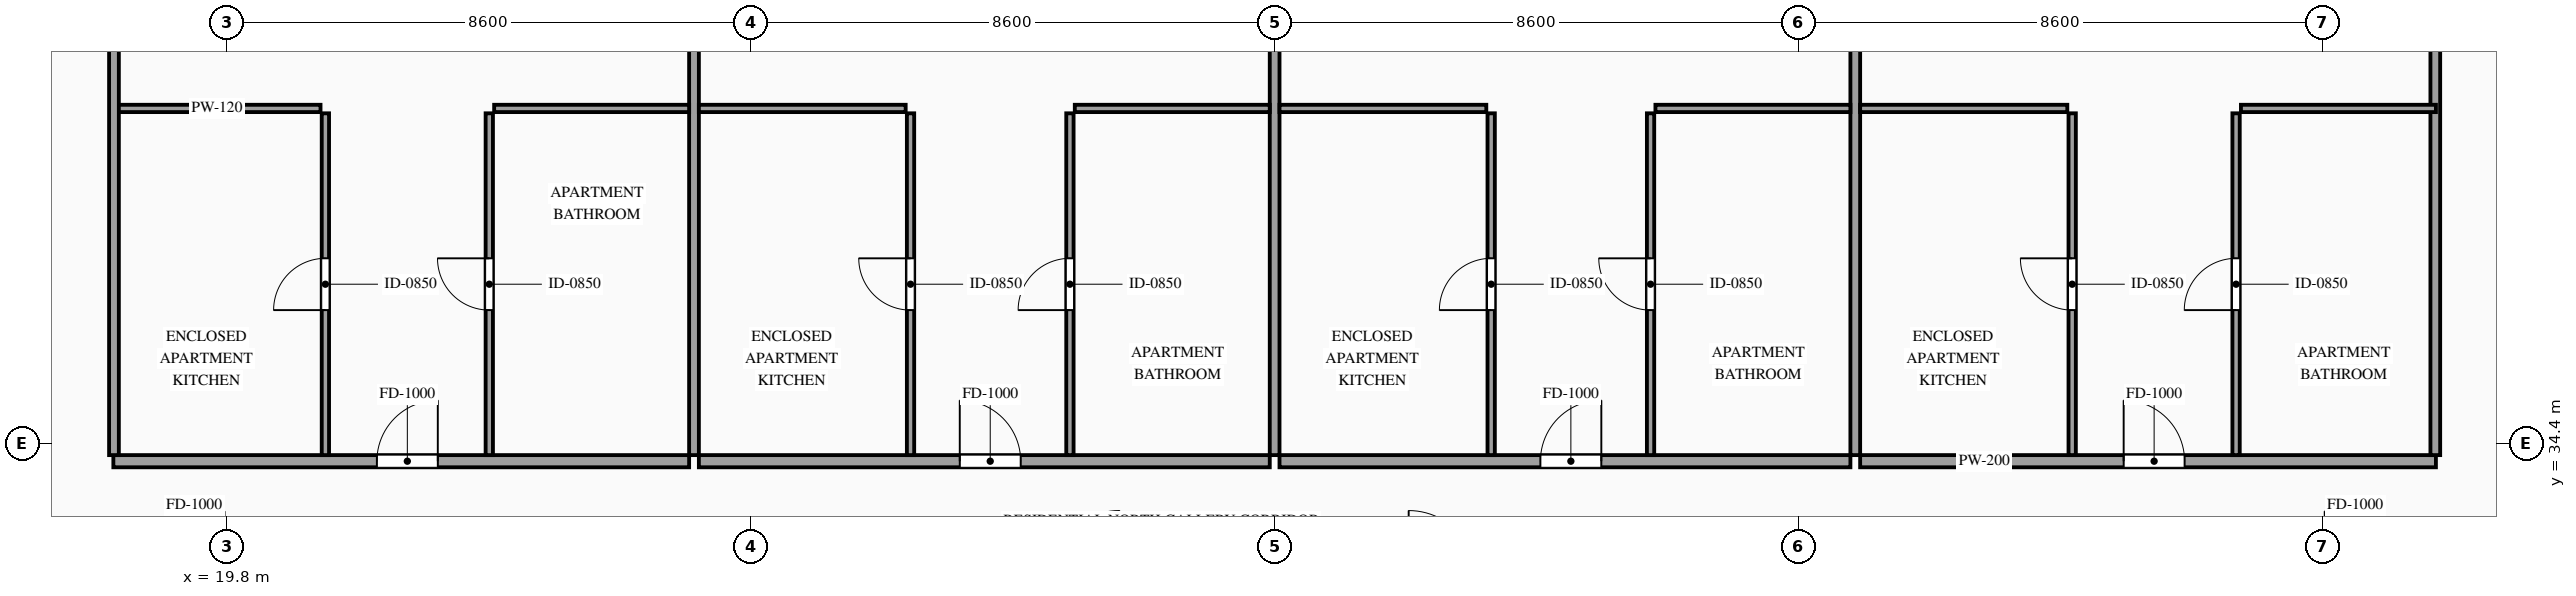
"""IFC4 building model, lengths in metres.
Left out: names, types, materials, properties, quantities, classifications, styles, units other than length and angle.
Written with IfcOpenShell. Run it as: python <this file> out.ifc"""

import sys

from ifc_helpers import new_model, si_unit, direction, frame, frame_2d, origin, place, context, subcontext, project, spatial, rectangle, extrude, source, transform, mapped, element, fill, save


model = new_model("IFC4")
c1 = context("Model", 3, precision=1e-05, world=origin(), true_north=direction((0.0, 1.0)))
c2 = subcontext(c1, "Body", "Model", "MODEL_VIEW")
j1 = project(units=[si_unit("LENGTHUNIT", "METRE"), si_unit("PLANEANGLEUNIT", "RADIAN")], contexts=[c1])
p1 = place(None, origin())
s1 = spatial("IfcSite", under=j1, at=p1, CompositionType="ELEMENT")
p2 = place(p1, origin())
s2 = spatial("IfcBuilding", under=s1, at=p2, CompositionType="ELEMENT")
p3 = place(p2, frame((0.0, 0.0, 181.0)))
s3 = spatial("IfcBuildingStorey", under=s2, at=p3, CompositionType="ELEMENT", Elevation=181.0)
p4 = place(p3, frame((17.94, 34.11, 0.0), z_axis=(0.0, 0.0, 1.0), x_axis=(1.0, 0.0, 0.0)))
e1 = element("IfcWall", 1, at=p4, inside=s3, PredefinedType="PARTITIONING", context=c2, shape_type="SweptSolid", body=[
    extrude(rectangle(XDim=9.45, YDim=0.2, at=frame_2d((4.725, 0.0))), origin(), (0.0, 0.0, 1.0), 3.28),
])
p5 = place(p4, frame((4.325, 0.0, 0.0)))
e2 = element("IfcOpeningElement", 2, at=p5, cuts=e1, PredefinedType="OPENING", context=c2, shape_type="SweptSolid", body=[
    extrude(rectangle(XDim=1.0, YDim=2.2, at=frame_2d((0.5, 1.1))), frame((0.0, 0.115, 0.0), z_axis=(0.0, -1.0, 0.0), x_axis=(1.0, 0.0, 0.0)), (0.0, 0.0, 1.0), 0.23),
])
m1 = source(origin(), c2, "Body", "SweptSolid", [
    extrude(rectangle(XDim=13.54, YDim=0.16, at=frame_2d((6.77, 0.0))), origin(), (0.0, 0.0, 1.0), 3.28),
])
p6 = place(p3, frame((27.47, 34.21, 0.0), z_axis=(0.0, 0.0, 1.0), x_axis=(0.0, 1.0, 0.0)))
e3 = element("IfcWall", 3, at=p6, inside=s3, PredefinedType="PARTITIONING", context=c2, shape_type="MappedRepresentation", body=[
    mapped(m1, transform((0.0, 0.0, 0.0), scale=1.0)),
])
m2 = source(origin(), c2, "Body", "SweptSolid", [
    extrude(rectangle(XDim=3.4, YDim=0.12, at=frame_2d((1.7, 0.0))), origin(), (0.0, 0.0, 1.0), 3.28),
])
p7 = place(p3, frame((17.94, 39.9, 0.0), z_axis=(0.0, 0.0, 1.0), x_axis=(1.0, 0.0, 0.0)))
e4 = element("IfcWall", 4, at=p7, inside=s3, PredefinedType="PARTITIONING", context=c2, shape_type="MappedRepresentation", body=[
    mapped(m2, transform((0.0, 0.0, 0.0), scale=1.0)),
])
p8 = place(p3, frame((21.42, 34.21, 0.0), z_axis=(0.0, 0.0, 1.0), x_axis=(0.0, 1.0, 0.0)))
e5 = element("IfcWall", 5, at=p8, inside=s3, PredefinedType="PARTITIONING", context=c2, shape_type="SweptSolid", body=[
    extrude(rectangle(XDim=5.61, YDim=0.12, at=frame_2d((2.805, 0.0))), origin(), (0.0, 0.0, 1.0), 3.28),
])
p9 = place(p8, frame((2.38, 0.0, 0.0)))
e6 = element("IfcOpeningElement", 6, at=p9, cuts=e5, PredefinedType="OPENING", context=c2, shape_type="SweptSolid", body=[
    extrude(rectangle(XDim=0.85, YDim=2.1, at=frame_2d((0.425, 1.05))), frame((0.0, 0.075, 0.0), z_axis=(0.0, -1.0, 0.0), x_axis=(1.0, 0.0, 0.0)), (0.0, 0.0, 1.0), 0.15),
])
m3 = source(origin(), c2, "Body", "SweptSolid", [
    extrude(rectangle(XDim=3.2, YDim=0.12, at=frame_2d((1.6, 0.0))), origin(), (0.0, 0.0, 1.0), 2.875),
])
p10 = place(p3, frame((24.19, 39.9, 0.0), z_axis=(0.0, 0.0, 1.0), x_axis=(1.0, 0.0, 0.0)))
e7 = element("IfcWall", 7, at=p10, inside=s3, PredefinedType="PARTITIONING", context=c2, shape_type="MappedRepresentation", body=[
    mapped(m3, transform((0.0, 0.0, 0.0), scale=1.0)),
])
p11 = place(p3, frame((24.11, 34.21, 0.0), z_axis=(0.0, 0.0, 1.0), x_axis=(0.0, 1.0, 0.0)))
e8 = element("IfcWall", 8, at=p11, inside=s3, PredefinedType="PARTITIONING", context=c2, shape_type="SweptSolid", body=[
    extrude(rectangle(XDim=5.61, YDim=0.12, at=frame_2d((2.805, 0.0))), origin(), (0.0, 0.0, 1.0), 3.28),
])
p12 = place(p11, frame((2.38, 0.0, 0.0)))
e9 = element("IfcOpeningElement", 9, at=p12, cuts=e8, PredefinedType="OPENING", context=c2, shape_type="SweptSolid", body=[
    extrude(rectangle(XDim=0.85, YDim=2.1, at=frame_2d((0.425, 1.05))), frame((0.0, 0.075, 0.0), z_axis=(0.0, -1.0, 0.0), x_axis=(1.0, 0.0, 0.0)), (0.0, 0.0, 1.0), 0.15),
])
p13 = place(p3, frame((27.55, 34.11, 0.0), z_axis=(0.0, 0.0, 1.0), x_axis=(1.0, 0.0, 0.0)))
e10 = element("IfcWall", 10, at=p13, inside=s3, PredefinedType="PARTITIONING", context=c2, shape_type="SweptSolid", body=[
    extrude(rectangle(XDim=9.37, YDim=0.2, at=frame_2d((4.685, 0.0))), origin(), (0.0, 0.0, 1.0), 3.28),
])
p14 = place(p13, frame((4.282, 0.0, 0.0)))
e11 = element("IfcOpeningElement", 11, at=p14, cuts=e10, PredefinedType="OPENING", context=c2, shape_type="SweptSolid", body=[
    extrude(rectangle(XDim=1.0, YDim=2.2, at=frame_2d((0.5, 1.1))), frame((0.0, 0.115, 0.0), z_axis=(0.0, -1.0, 0.0), x_axis=(1.0, 0.0, 0.0)), (0.0, 0.0, 1.0), 0.23),
])
m4 = source(origin(), c2, "Body", "SweptSolid", [
    extrude(rectangle(XDim=13.54, YDim=0.16, at=frame_2d((6.77, 0.0))), origin(), (0.0, 0.0, 1.0), 2.687),
])
p15 = place(p3, frame((37.0, 34.21, 0.0), z_axis=(0.0, 0.0, 1.0), x_axis=(0.0, 1.0, 0.0)))
e12 = element("IfcWall", 12, at=p15, inside=s3, PredefinedType="PARTITIONING", context=c2, shape_type="MappedRepresentation", body=[
    mapped(m4, transform((0.0, 0.0, 0.0), scale=1.0)),
])
m5 = source(origin(), c2, "Body", "SweptSolid", [
    extrude(rectangle(XDim=3.394, YDim=0.12, at=frame_2d((1.697, 0.0))), origin(), (0.0, 0.0, 1.0), 2.875),
])
p16 = place(p3, frame((27.55, 39.9, 0.0), z_axis=(0.0, 0.0, 1.0), x_axis=(1.0, 0.0, 0.0)))
e13 = element("IfcWall", 13, at=p16, inside=s3, PredefinedType="PARTITIONING", context=c2, shape_type="MappedRepresentation", body=[
    mapped(m5, transform((0.0, 0.0, 0.0), scale=1.0)),
])
p17 = place(p3, frame((31.024, 34.21, 0.0), z_axis=(0.0, 0.0, 1.0), x_axis=(0.0, 1.0, 0.0)))
e14 = element("IfcWall", 14, at=p17, inside=s3, PredefinedType="PARTITIONING", context=c2, shape_type="SweptSolid", body=[
    extrude(rectangle(XDim=5.61, YDim=0.12, at=frame_2d((2.805, 0.0))), origin(), (0.0, 0.0, 1.0), 3.28),
])
p18 = place(p17, frame((2.38, 0.0, 0.0)))
e15 = element("IfcOpeningElement", 15, at=p18, cuts=e14, PredefinedType="OPENING", context=c2, shape_type="SweptSolid", body=[
    extrude(rectangle(XDim=0.85, YDim=2.1, at=frame_2d((0.425, 1.05))), frame((0.0, 0.075, 0.0), z_axis=(0.0, -1.0, 0.0), x_axis=(1.0, 0.0, 0.0)), (0.0, 0.0, 1.0), 0.15),
])
p19 = place(p3, frame((33.72, 39.9, 0.0), z_axis=(0.0, 0.0, 1.0), x_axis=(1.0, 0.0, 0.0)))
e16 = element("IfcWall", 16, at=p19, inside=s3, PredefinedType="PARTITIONING", context=c2, shape_type="MappedRepresentation", body=[
    mapped(m3, transform((0.0, 0.0, 0.0), scale=1.0)),
])
p20 = place(p3, frame((33.64, 34.21, 0.0), z_axis=(0.0, 0.0, 1.0), x_axis=(0.0, 1.0, 0.0)))
e17 = element("IfcWall", 17, at=p20, inside=s3, PredefinedType="PARTITIONING", context=c2, shape_type="SweptSolid", body=[
    extrude(rectangle(XDim=5.61, YDim=0.12, at=frame_2d((2.805, 0.0))), origin(), (0.0, 0.0, 1.0), 3.28),
])
p21 = place(p20, frame((2.38, 0.0, 0.0)))
e18 = element("IfcOpeningElement", 18, at=p21, cuts=e17, PredefinedType="OPENING", context=c2, shape_type="SweptSolid", body=[
    extrude(rectangle(XDim=0.85, YDim=2.1, at=frame_2d((0.425, 1.05))), frame((0.0, 0.075, 0.0), z_axis=(0.0, -1.0, 0.0), x_axis=(1.0, 0.0, 0.0)), (0.0, 0.0, 1.0), 0.15),
])
p22 = place(p3, frame((37.08, 34.11, 0.0), z_axis=(0.0, 0.0, 1.0), x_axis=(1.0, 0.0, 0.0)))
e19 = element("IfcWall", 19, at=p22, inside=s3, PredefinedType="PARTITIONING", context=c2, shape_type="SweptSolid", body=[
    extrude(rectangle(XDim=9.37, YDim=0.2, at=frame_2d((4.685, 0.0))), origin(), (0.0, 0.0, 1.0), 3.28),
])
p23 = place(p22, frame((4.282, 0.0, 0.0)))
e20 = element("IfcOpeningElement", 20, at=p23, cuts=e19, PredefinedType="OPENING", context=c2, shape_type="SweptSolid", body=[
    extrude(rectangle(XDim=1.0, YDim=2.2, at=frame_2d((0.5, 1.1))), frame((0.0, 0.115, 0.0), z_axis=(0.0, -1.0, 0.0), x_axis=(1.0, 0.0, 0.0)), (0.0, 0.0, 1.0), 0.23),
])
p24 = place(p3, frame((46.53, 34.21, 0.0), z_axis=(0.0, 0.0, 1.0), x_axis=(0.0, 1.0, 0.0)))
e21 = element("IfcWall", 21, at=p24, inside=s3, PredefinedType="PARTITIONING", context=c2, shape_type="MappedRepresentation", body=[
    mapped(m1, transform((0.0, 0.0, 0.0), scale=1.0)),
])
p25 = place(p3, frame((37.08, 39.9, 0.0), z_axis=(0.0, 0.0, 1.0), x_axis=(1.0, 0.0, 0.0)))
e22 = element("IfcWall", 22, at=p25, inside=s3, PredefinedType="PARTITIONING", context=c2, shape_type="MappedRepresentation", body=[
    mapped(m5, transform((0.0, 0.0, 0.0), scale=1.0)),
])
p26 = place(p3, frame((40.554, 34.21, 0.0), z_axis=(0.0, 0.0, 1.0), x_axis=(0.0, 1.0, 0.0)))
e23 = element("IfcWall", 23, at=p26, inside=s3, PredefinedType="PARTITIONING", context=c2, shape_type="SweptSolid", body=[
    extrude(rectangle(XDim=5.61, YDim=0.12, at=frame_2d((2.805, 0.0))), origin(), (0.0, 0.0, 1.0), 3.28),
])
p27 = place(p26, frame((2.38, 0.0, 0.0)))
e24 = element("IfcOpeningElement", 24, at=p27, cuts=e23, PredefinedType="OPENING", context=c2, shape_type="SweptSolid", body=[
    extrude(rectangle(XDim=0.85, YDim=2.1, at=frame_2d((0.425, 1.05))), frame((0.0, 0.075, 0.0), z_axis=(0.0, -1.0, 0.0), x_axis=(1.0, 0.0, 0.0)), (0.0, 0.0, 1.0), 0.15),
])
p28 = place(p3, frame((43.25, 39.9, 0.0), z_axis=(0.0, 0.0, 1.0), x_axis=(1.0, 0.0, 0.0)))
e25 = element("IfcWall", 25, at=p28, inside=s3, PredefinedType="PARTITIONING", context=c2, shape_type="MappedRepresentation", body=[
    mapped(m3, transform((0.0, 0.0, 0.0), scale=1.0)),
])
p29 = place(p3, frame((43.17, 34.21, 0.0), z_axis=(0.0, 0.0, 1.0), x_axis=(0.0, 1.0, 0.0)))
e26 = element("IfcWall", 26, at=p29, inside=s3, PredefinedType="PARTITIONING", context=c2, shape_type="SweptSolid", body=[
    extrude(rectangle(XDim=5.61, YDim=0.12, at=frame_2d((2.805, 0.0))), origin(), (0.0, 0.0, 1.0), 3.28),
])
p30 = place(p29, frame((2.38, 0.0, 0.0)))
e27 = element("IfcOpeningElement", 27, at=p30, cuts=e26, PredefinedType="OPENING", context=c2, shape_type="SweptSolid", body=[
    extrude(rectangle(XDim=0.85, YDim=2.1, at=frame_2d((0.425, 1.05))), frame((0.0, 0.075, 0.0), z_axis=(0.0, -1.0, 0.0), x_axis=(1.0, 0.0, 0.0)), (0.0, 0.0, 1.0), 0.15),
])
p31 = place(p3, frame((46.61, 34.11, 0.0), z_axis=(0.0, 0.0, 1.0), x_axis=(1.0, 0.0, 0.0)))
e28 = element("IfcWall", 28, at=p31, inside=s3, PredefinedType="PARTITIONING", context=c2, shape_type="SweptSolid", body=[
    extrude(rectangle(XDim=9.45, YDim=0.2, at=frame_2d((4.725, 0.0))), origin(), (0.0, 0.0, 1.0), 3.28),
])
p32 = place(p31, frame((4.325, 0.0, 0.0)))
e29 = element("IfcOpeningElement", 29, at=p32, cuts=e28, PredefinedType="OPENING", context=c2, shape_type="SweptSolid", body=[
    extrude(rectangle(XDim=1.0, YDim=2.2, at=frame_2d((0.5, 1.1))), frame((0.0, 0.115, 0.0), z_axis=(0.0, -1.0, 0.0), x_axis=(1.0, 0.0, 0.0)), (0.0, 0.0, 1.0), 0.23),
])
m6 = source(origin(), c2, "Body", "SweptSolid", [
    extrude(rectangle(XDim=13.39, YDim=0.16, at=frame_2d((6.695, 0.0))), origin(), (0.0, 0.0, 1.0), 3.28),
])
for number, where, z_axis, x_axis in (
    (30, (17.95, 34.21, 0.0), (0.0, 0.0, 1.0), (0.0, 1.0, 0.0)),
    (31, (56.05, 34.21, 0.0), (0.0, 0.0, 1.0), (0.0, 1.0, 0.0)),
):
    element("IfcWall", number, at=place(p3, frame(where, z_axis=z_axis, x_axis=x_axis)), inside=s3, PredefinedType="PARTITIONING", context=c2, shape_type="MappedRepresentation", body=[
        mapped(m6, transform((0.0, 0.0, 0.0), scale=1.0)),
    ])
m7 = source(origin(), c2, "Body", "SweptSolid", [
    extrude(rectangle(XDim=3.4, YDim=0.12, at=frame_2d((1.7, 0.0))), origin(), (0.0, 0.0, 1.0), 2.875),
])
p33 = place(p3, frame((46.61, 39.9, 0.0), z_axis=(0.0, 0.0, 1.0), x_axis=(1.0, 0.0, 0.0)))
e32 = element("IfcWall", 32, at=p33, inside=s3, PredefinedType="PARTITIONING", context=c2, shape_type="MappedRepresentation", body=[
    mapped(m7, transform((0.0, 0.0, 0.0), scale=1.0)),
])
p34 = place(p3, frame((50.09, 34.21, 0.0), z_axis=(0.0, 0.0, 1.0), x_axis=(0.0, 1.0, 0.0)))
e33 = element("IfcWall", 33, at=p34, inside=s3, PredefinedType="PARTITIONING", context=c2, shape_type="SweptSolid", body=[
    extrude(rectangle(XDim=5.61, YDim=0.12, at=frame_2d((2.805, 0.0))), origin(), (0.0, 0.0, 1.0), 2.775),
])
p35 = place(p34, frame((2.38, 0.0, 0.0)))
e34 = element("IfcOpeningElement", 34, at=p35, cuts=e33, PredefinedType="OPENING", context=c2, shape_type="SweptSolid", body=[
    extrude(rectangle(XDim=0.85, YDim=2.1, at=frame_2d((0.425, 1.05))), frame((0.0, 0.075, 0.0), z_axis=(0.0, -1.0, 0.0), x_axis=(1.0, 0.0, 0.0)), (0.0, 0.0, 1.0), 0.15),
])
m8 = source(origin(), c2, "Body", "SweptSolid", [
    extrude(rectangle(XDim=3.2, YDim=0.12, at=frame_2d((1.6, 0.0))), origin(), (0.0, 0.0, 1.0), 3.28),
])
p36 = place(p3, frame((52.86, 39.9, 0.0), z_axis=(0.0, 0.0, 1.0), x_axis=(1.0, 0.0, 0.0)))
e35 = element("IfcWall", 35, at=p36, inside=s3, PredefinedType="PARTITIONING", context=c2, shape_type="MappedRepresentation", body=[
    mapped(m8, transform((0.0, 0.0, 0.0), scale=1.0)),
])
p37 = place(p3, frame((52.78, 34.21, 0.0), z_axis=(0.0, 0.0, 1.0), x_axis=(0.0, 1.0, 0.0)))
e36 = element("IfcWall", 36, at=p37, inside=s3, PredefinedType="PARTITIONING", context=c2, shape_type="SweptSolid", body=[
    extrude(rectangle(XDim=5.61, YDim=0.12, at=frame_2d((2.805, 0.0))), origin(), (0.0, 0.0, 1.0), 3.28),
])
p38 = place(p37, frame((2.38, 0.0, 0.0)))
e37 = element("IfcOpeningElement", 37, at=p38, cuts=e36, PredefinedType="OPENING", context=c2, shape_type="SweptSolid", body=[
    extrude(rectangle(XDim=0.85, YDim=2.1, at=frame_2d((0.425, 1.05))), frame((0.0, 0.075, 0.0), z_axis=(0.0, -1.0, 0.0), x_axis=(1.0, 0.0, 0.0)), (0.0, 0.0, 1.0), 0.15),
])
m9 = source(origin(), c2, "Body", "SweptSolid", [
    extrude(rectangle(XDim=1.0, YDim=2.2, at=frame_2d((0.5, 1.1))), frame((0.0, 0.025, 0.0), z_axis=(0.0, -1.0, 0.0), x_axis=(1.0, 0.0, 0.0)), (0.0, 0.0, 1.0), 0.05),
])
p39 = place(p5, origin())
e38 = element("IfcDoor", 38, at=p39, inside=s3, OperationType="SINGLE_SWING_RIGHT", PredefinedType="DOOR", context=c2, shape_type="MappedRepresentation", body=[
    mapped(m9, transform((0.0, 0.0, 0.0), scale=1.0)),
])
fill(e2, e38)
m10 = source(origin(), c2, "Body", "SweptSolid", [
    extrude(rectangle(XDim=0.85, YDim=2.1, at=frame_2d((0.425, 1.05))), frame((0.0, 0.025, 0.0), z_axis=(0.0, -1.0, 0.0), x_axis=(1.0, 0.0, 0.0)), (0.0, 0.0, 1.0), 0.05),
])
p40 = place(p9, origin())
e39 = element("IfcDoor", 39, at=p40, inside=s3, OperationType="SINGLE_SWING_LEFT", PredefinedType="DOOR", context=c2, shape_type="MappedRepresentation", body=[
    mapped(m10, transform((0.0, 0.0, 0.0), scale=1.0)),
])
fill(e6, e39)
p41 = place(p12, origin())
e40 = element("IfcDoor", 40, at=p41, inside=s3, OperationType="SINGLE_SWING_RIGHT", PredefinedType="DOOR", context=c2, shape_type="MappedRepresentation", body=[
    mapped(m10, transform((0.0, 0.0, 0.0), scale=1.0)),
])
fill(e9, e40)
p42 = place(p14, origin())
e41 = element("IfcDoor", 41, at=p42, inside=s3, OperationType="SINGLE_SWING_LEFT", PredefinedType="DOOR", context=c2, shape_type="MappedRepresentation", body=[
    mapped(m9, transform((0.0, 0.0, 0.0), scale=1.0)),
])
fill(e11, e41)
p43 = place(p18, origin())
e42 = element("IfcDoor", 42, at=p43, inside=s3, OperationType="SINGLE_SWING_RIGHT", PredefinedType="DOOR", context=c2, shape_type="MappedRepresentation", body=[
    mapped(m10, transform((0.0, 0.0, 0.0), scale=1.0)),
])
fill(e15, e42)
p44 = place(p21, origin())
e43 = element("IfcDoor", 43, at=p44, inside=s3, OperationType="SINGLE_SWING_LEFT", PredefinedType="DOOR", context=c2, shape_type="MappedRepresentation", body=[
    mapped(m10, transform((0.0, 0.0, 0.0), scale=1.0)),
])
fill(e18, e43)
p45 = place(p23, origin())
e44 = element("IfcDoor", 44, at=p45, inside=s3, OperationType="SINGLE_SWING_RIGHT", PredefinedType="DOOR", context=c2, shape_type="MappedRepresentation", body=[
    mapped(m9, transform((0.0, 0.0, 0.0), scale=1.0)),
])
fill(e20, e44)
p46 = place(p27, origin())
e45 = element("IfcDoor", 45, at=p46, inside=s3, OperationType="SINGLE_SWING_LEFT", PredefinedType="DOOR", context=c2, shape_type="MappedRepresentation", body=[
    mapped(m10, transform((0.0, 0.0, 0.0), scale=1.0)),
])
fill(e24, e45)
p47 = place(p30, origin())
e46 = element("IfcDoor", 46, at=p47, inside=s3, OperationType="SINGLE_SWING_RIGHT", PredefinedType="DOOR", context=c2, shape_type="MappedRepresentation", body=[
    mapped(m10, transform((0.0, 0.0, 0.0), scale=1.0)),
])
fill(e27, e46)
p48 = place(p32, origin())
e47 = element("IfcDoor", 47, at=p48, inside=s3, OperationType="SINGLE_SWING_LEFT", PredefinedType="DOOR", context=c2, shape_type="MappedRepresentation", body=[
    mapped(m9, transform((0.0, 0.0, 0.0), scale=1.0)),
])
fill(e29, e47)
p49 = place(p35, origin())
e48 = element("IfcDoor", 48, at=p49, inside=s3, OperationType="SINGLE_SWING_RIGHT", PredefinedType="DOOR", context=c2, shape_type="MappedRepresentation", body=[
    mapped(m10, transform((0.0, 0.0, 0.0), scale=1.0)),
])
fill(e34, e48)
p50 = place(p38, origin())
e49 = element("IfcDoor", 49, at=p50, inside=s3, OperationType="SINGLE_SWING_LEFT", PredefinedType="DOOR", context=c2, shape_type="MappedRepresentation", body=[
    mapped(m10, transform((0.0, 0.0, 0.0), scale=1.0)),
])
fill(e37, e49)
save(model, sys.argv[1])
